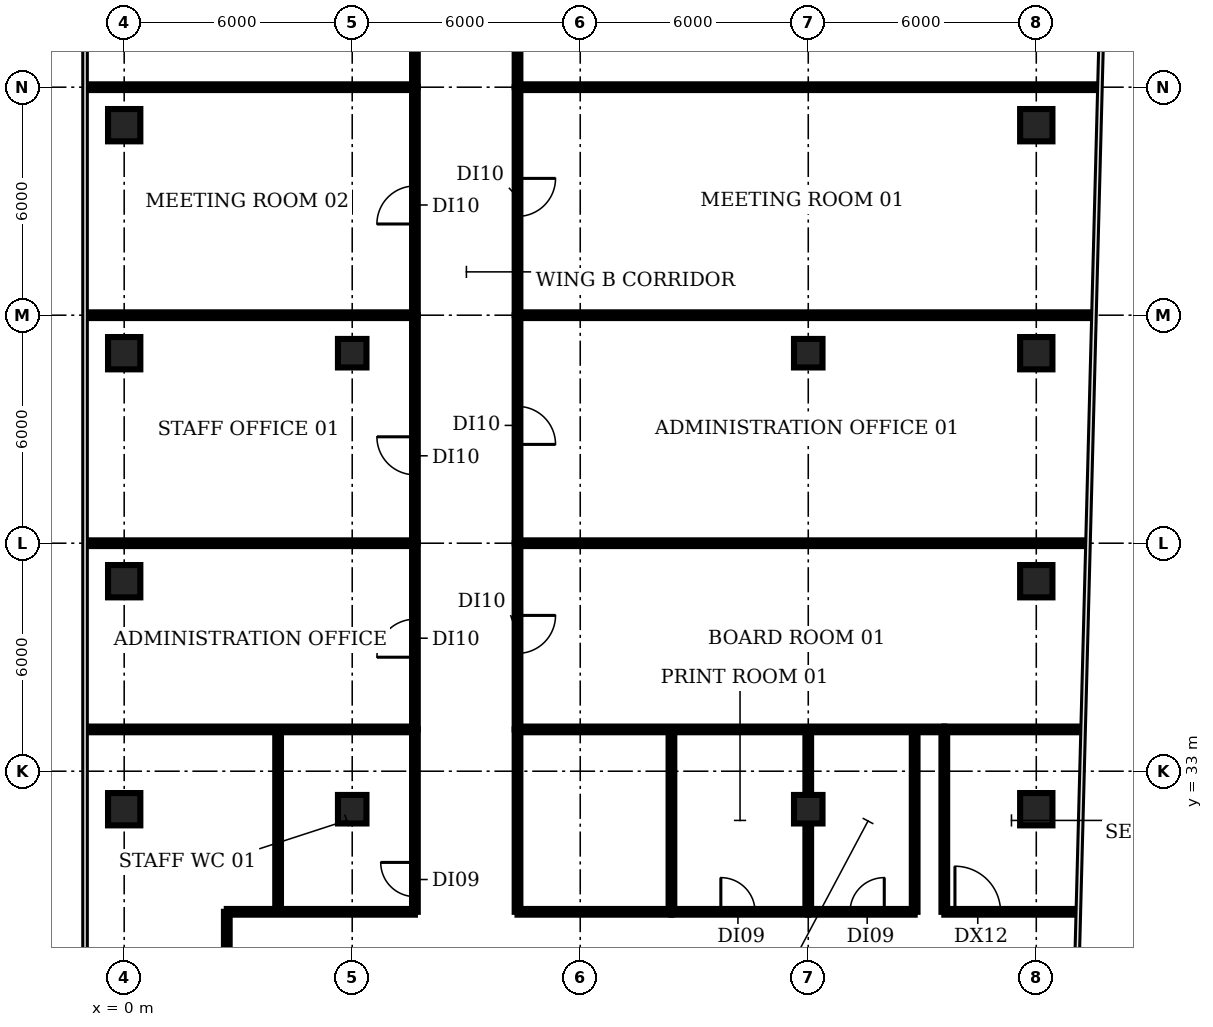
"""IFC4 building model, lengths in metres.
Left out: names, types, materials, properties, quantities, classifications, styles, units other than length and angle.
Written with IfcOpenShell. Run it as: python <this file> out.ifc"""

import sys

from ifc_helpers import new_model, si_unit, direction, frame, frame_2d, origin, origin_2d, place, context, subcontext, project, spatial, rectangle, extrude, element, fill, save


model = new_model("IFC4")
c1 = context("Model", 3, precision=1e-05, world=origin(), true_north=direction((0.0, 1.0)))
c2 = subcontext(c1, "Body", "Model", "MODEL_VIEW")
j1 = project(units=[si_unit("LENGTHUNIT", "METRE"), si_unit("PLANEANGLEUNIT", "RADIAN")], contexts=[c1])
p1 = place(None, origin())
s1 = spatial("IfcSite", under=j1, at=p1, CompositionType="ELEMENT")
p2 = place(p1, origin())
s2 = spatial("IfcBuilding", under=s1, at=p2, CompositionType="ELEMENT")
p3 = place(p2, frame((0.0, 0.0, 163.4)))
s3 = spatial("IfcBuildingStorey", under=s2, at=p3, CompositionType="ELEMENT", Elevation=163.4)
for number, where, z_axis, x_axis in (
    (1, (0.0, 32.0, 0.0), (0.0, 0.0, 1.0), (1.0, 0.0, 0.0)),
    (2, (0.0, 38.0, 0.0), (0.0, 0.0, 1.0), (1.0, 0.0, 0.0)),
    (3, (0.0, 44.0, 0.0), (0.0, 0.0, 1.0), (1.0, 0.0, 0.0)),
    (4, (0.0, 50.0, 0.0), (0.0, 0.0, 1.0), (1.0, 0.0, 0.0)),
):
    element("IfcColumn", number, at=place(p3, frame(where, z_axis=z_axis, x_axis=x_axis)), inside=s3, PredefinedType="COLUMN", context=c2, shape_type="SweptSolid", body=[
        extrude(rectangle(XDim=0.85, YDim=0.85, at=origin_2d()), origin(), (0.0, 0.0, 1.0), 3.85),
    ])
for number, where, z_axis, x_axis in (
    (5, (6.0, 32.0, 0.0), (0.0, 0.0, 1.0), (1.0, 0.0, 0.0)),
    (6, (6.0, 44.0, 0.0), (0.0, 0.0, 1.0), (1.0, 0.0, 0.0)),
    (7, (18.0, 32.0, 0.0), (0.0, 0.0, 1.0), (1.0, 0.0, 0.0)),
    (8, (18.0, 44.0, 0.0), (0.0, 0.0, 1.0), (1.0, 0.0, 0.0)),
):
    element("IfcColumn", number, at=place(p3, frame(where, z_axis=z_axis, x_axis=x_axis)), inside=s3, PredefinedType="COLUMN", context=c2, shape_type="SweptSolid", body=[
        extrude(rectangle(XDim=0.75, YDim=0.75, at=origin_2d()), origin(), (0.0, 0.0, 1.0), 3.85),
    ])
for number, where, z_axis, x_axis in (
    (9, (24.0, 32.0, 0.0), (0.0, 0.0, 1.0), (1.0, 0.0, 0.0)),
    (10, (24.0, 38.0, 0.0), (0.0, 0.0, 1.0), (1.0, 0.0, 0.0)),
    (11, (24.0, 44.0, 0.0), (0.0, 0.0, 1.0), (1.0, 0.0, 0.0)),
    (12, (24.0, 50.0, 0.0), (0.0, 0.0, 1.0), (1.0, 0.0, 0.0)),
):
    element("IfcColumn", number, at=place(p3, frame(where, z_axis=z_axis, x_axis=x_axis)), inside=s3, PredefinedType="COLUMN", context=c2, shape_type="SweptSolid", body=[
        extrude(rectangle(XDim=0.85, YDim=0.85, at=origin_2d()), origin(), (0.0, 0.0, 1.0), 3.85),
    ])
for number, where, z_axis, x_axis in (
    (13, (-0.98, 34.1, 0.0), (0.0, 0.0, 1.0), (1.0, 0.0, 0.0)),
    (14, (-0.98, 39.0, 0.0), (0.0, 0.0, 1.0), (1.0, 0.0, 0.0)),
):
    element("IfcWall", number, at=place(p3, frame(where, z_axis=z_axis, x_axis=x_axis)), inside=s3, PredefinedType="PARTITIONING", context=c2, shape_type="SweptSolid", body=[
        extrude(rectangle(XDim=8.63, YDim=0.15, at=frame_2d((4.315, 0.0))), origin(), (0.0, 0.0, 1.0), 2.88),
    ])
for number, where, z_axis, x_axis in (
    (15, (-0.965, 45.0, 0.0), (0.0, 0.0, 1.0), (1.0, 0.0, 0.0)),
    (16, (-0.965, 51.0, 0.0), (0.0, 0.0, 1.0), (1.0, 0.0, 0.0)),
):
    element("IfcWall", number, at=place(p3, frame(where, z_axis=z_axis, x_axis=x_axis)), inside=s3, PredefinedType="PARTITIONING", context=c2, shape_type="SweptSolid", body=[
        extrude(rectangle(XDim=8.615, YDim=0.15, at=frame_2d((4.308, 0.0))), origin(), (0.0, 0.0, 1.0), 2.88),
    ])
p4 = place(p3, frame((2.7, 25.4, 0.0), z_axis=(0.0, 0.0, 1.0), x_axis=(0.0, 1.0, 0.0)))
e17 = element("IfcWall", 17, at=p4, inside=s3, PredefinedType="PARTITIONING", context=c2, shape_type="SweptSolid", body=[
    extrude(rectangle(XDim=3.9, YDim=0.15, at=frame_2d((1.95, 0.0))), origin(), (0.0, 0.0, 1.0), 2.88),
])
p5 = place(p3, frame((2.7, 29.3, 0.0), z_axis=(0.0, 0.0, 1.0), x_axis=(1.0, 0.0, 0.0)))
e18 = element("IfcWall", 18, at=p5, inside=s3, PredefinedType="PARTITIONING", context=c2, shape_type="SweptSolid", body=[
    extrude(rectangle(XDim=4.95, YDim=0.15, at=frame_2d((2.475, 0.0))), origin(), (0.0, 0.0, 1.0), 2.88),
])
p6 = place(p3, frame((4.05, 29.3, 0.0), z_axis=(0.0, 0.0, 1.0), x_axis=(0.0, 1.0, 0.0)))
e19 = element("IfcWall", 19, at=p6, inside=s3, PredefinedType="PARTITIONING", context=c2, shape_type="SweptSolid", body=[
    extrude(rectangle(XDim=4.8, YDim=0.15, at=frame_2d((2.4, 0.0))), origin(), (0.0, 0.0, 1.0), 2.88),
])
p7 = place(p3, frame((7.65, 29.3, 0.0), z_axis=(0.0, 0.0, 1.0), x_axis=(0.0, 1.0, 0.0)))
e20 = element("IfcWall", 20, at=p7, inside=s3, PredefinedType="PARTITIONING", context=c2, shape_type="SweptSolid", body=[
    extrude(rectangle(XDim=4.8, YDim=0.15, at=frame_2d((2.4, 0.0))), origin(), (0.0, 0.0, 1.0), 2.88),
])
p8 = place(p7, frame((0.4, 0.0, 0.0)))
e21 = element("IfcOpeningElement", 21, at=p8, cuts=e20, PredefinedType="OPENING", context=c2, shape_type="SweptSolid", body=[
    extrude(rectangle(XDim=0.9, YDim=2.1, at=frame_2d((0.45, 1.05))), frame((0.0, 0.085, 0.0), z_axis=(0.0, -1.0, 0.0), x_axis=(1.0, 0.0, 0.0)), (0.0, 0.0, 1.0), 0.17),
])
p9 = place(p3, frame((7.65, 34.1, 0.0), z_axis=(0.0, 0.0, 1.0), x_axis=(0.0, 1.0, 0.0)))
e22 = element("IfcWall", 22, at=p9, inside=s3, PredefinedType="PARTITIONING", context=c2, shape_type="SweptSolid", body=[
    extrude(rectangle(XDim=4.9, YDim=0.15, at=frame_2d((2.45, 0.0))), origin(), (0.0, 0.0, 1.0), 2.88),
])
p10 = place(p9, frame((1.9, 0.0, 0.0)))
e23 = element("IfcOpeningElement", 23, at=p10, cuts=e22, PredefinedType="OPENING", context=c2, shape_type="SweptSolid", body=[
    extrude(rectangle(XDim=1.0, YDim=2.1, at=frame_2d((0.5, 1.05))), frame((0.0, 0.085, 0.0), z_axis=(0.0, -1.0, 0.0), x_axis=(1.0, 0.0, 0.0)), (0.0, 0.0, 1.0), 0.17),
])
p11 = place(p3, frame((7.65, 39.0, 0.0), z_axis=(0.0, 0.0, 1.0), x_axis=(0.0, 1.0, 0.0)))
e24 = element("IfcWall", 24, at=p11, inside=s3, PredefinedType="PARTITIONING", context=c2, shape_type="SweptSolid", body=[
    extrude(rectangle(XDim=6.0, YDim=0.15, at=frame_2d((3.0, 0.0))), origin(), (0.0, 0.0, 1.0), 2.88),
])
p12 = place(p11, frame((1.8, 0.0, 0.0)))
e25 = element("IfcOpeningElement", 25, at=p12, cuts=e24, PredefinedType="OPENING", context=c2, shape_type="SweptSolid", body=[
    extrude(rectangle(XDim=1.0, YDim=2.1, at=frame_2d((0.5, 1.05))), frame((0.0, 0.085, 0.0), z_axis=(0.0, -1.0, 0.0), x_axis=(1.0, 0.0, 0.0)), (0.0, 0.0, 1.0), 0.17),
])
p13 = place(p3, frame((7.65, 45.0, 0.0), z_axis=(0.0, 0.0, 1.0), x_axis=(0.0, 1.0, 0.0)))
e26 = element("IfcWall", 26, at=p13, inside=s3, PredefinedType="PARTITIONING", context=c2, shape_type="SweptSolid", body=[
    extrude(rectangle(XDim=6.0, YDim=0.15, at=frame_2d((3.0, 0.0))), origin(), (0.0, 0.0, 1.0), 2.88),
])
p14 = place(p13, frame((2.4, 0.0, 0.0)))
e27 = element("IfcOpeningElement", 27, at=p14, cuts=e26, PredefinedType="OPENING", context=c2, shape_type="SweptSolid", body=[
    extrude(rectangle(XDim=1.0, YDim=2.1, at=frame_2d((0.5, 1.05))), frame((0.0, 0.085, 0.0), z_axis=(0.0, -1.0, 0.0), x_axis=(1.0, 0.0, 0.0)), (0.0, 0.0, 1.0), 0.17),
])
p15 = place(p3, frame((7.65, 51.0, 0.0), z_axis=(0.0, 0.0, 1.0), x_axis=(0.0, 1.0, 0.0)))
e28 = element("IfcWall", 28, at=p15, inside=s3, PredefinedType="PARTITIONING", context=c2, shape_type="SweptSolid", body=[
    extrude(rectangle(XDim=12.083, YDim=0.15, at=frame_2d((6.042, 0.0))), origin(), (0.0, 0.0, 1.0), 2.88),
])
p16 = place(p15, frame((6.97, 0.0, 0.0)))
e29 = element("IfcOpeningElement", 29, at=p16, cuts=e28, PredefinedType="OPENING", context=c2, shape_type="SweptSolid", body=[
    extrude(rectangle(XDim=1.2, YDim=2.1, at=frame_2d((0.6, 1.05))), frame((0.0, 0.085, 0.0), z_axis=(0.0, -1.0, 0.0), x_axis=(1.0, 0.0, 0.0)), (0.0, 0.0, 1.0), 0.17),
])
p17 = place(p3, frame((10.35, 29.3, 0.0), z_axis=(0.0, 0.0, 1.0), x_axis=(0.0, 1.0, 0.0)))
e30 = element("IfcWall", 30, at=p17, inside=s3, PredefinedType="PARTITIONING", context=c2, shape_type="SweptSolid", body=[
    extrude(rectangle(XDim=4.8, YDim=0.15, at=frame_2d((2.4, 0.0))), origin(), (0.0, 0.0, 1.0), 2.88),
])
p18 = place(p3, frame((10.35, 29.3, 0.0), z_axis=(0.0, 0.0, 1.0), x_axis=(1.0, 0.0, 0.0)))
e31 = element("IfcWall", 31, at=p18, inside=s3, PredefinedType="PARTITIONING", context=c2, shape_type="SweptSolid", body=[
    extrude(rectangle(XDim=4.05, YDim=0.15, at=frame_2d((2.025, 0.0))), origin(), (0.0, 0.0, 1.0), 2.88),
])
p19 = place(p3, frame((10.35, 34.1, 0.0), z_axis=(0.0, 0.0, 1.0), x_axis=(1.0, 0.0, 0.0)))
e32 = element("IfcWall", 32, at=p19, inside=s3, PredefinedType="PARTITIONING", context=c2, shape_type="SweptSolid", body=[
    extrude(rectangle(XDim=11.23, YDim=0.15, at=frame_2d((5.615, 0.0))), origin(), (0.0, 0.0, 1.0), 2.88),
])
p20 = place(p3, frame((10.35, 39.0, 0.0), z_axis=(0.0, 0.0, 1.0), x_axis=(0.0, -1.0, 0.0)))
e33 = element("IfcWall", 33, at=p20, inside=s3, PredefinedType="PARTITIONING", context=c2, shape_type="SweptSolid", body=[
    extrude(rectangle(XDim=4.9, YDim=0.15, at=frame_2d((2.45, 0.0))), origin(), (0.0, 0.0, 1.0), 2.88),
])
p21 = place(p20, frame((1.9, 0.0, 0.0)))
e34 = element("IfcOpeningElement", 34, at=p21, cuts=e33, PredefinedType="OPENING", context=c2, shape_type="SweptSolid", body=[
    extrude(rectangle(XDim=1.0, YDim=2.1, at=frame_2d((0.5, 1.05))), frame((0.0, 0.085, 0.0), z_axis=(0.0, -1.0, 0.0), x_axis=(1.0, 0.0, 0.0)), (0.0, 0.0, 1.0), 0.17),
])
p22 = place(p3, frame((10.35, 39.0, 0.0), z_axis=(0.0, 0.0, 1.0), x_axis=(1.0, 0.0, 0.0)))
e35 = element("IfcWall", 35, at=p22, inside=s3, PredefinedType="PARTITIONING", context=c2, shape_type="SweptSolid", body=[
    extrude(rectangle(XDim=14.96, YDim=0.15, at=frame_2d((7.48, 0.0))), origin(), (0.0, 0.0, 1.0), 2.88),
])
p23 = place(p3, frame((10.35, 45.0, 0.0), z_axis=(0.0, 0.0, 1.0), x_axis=(0.0, -1.0, 0.0)))
e36 = element("IfcWall", 36, at=p23, inside=s3, PredefinedType="PARTITIONING", context=c2, shape_type="SweptSolid", body=[
    extrude(rectangle(XDim=6.0, YDim=0.15, at=frame_2d((3.0, 0.0))), origin(), (0.0, 0.0, 1.0), 2.88),
])
p24 = place(p23, frame((2.4, 0.0, 0.0)))
e37 = element("IfcOpeningElement", 37, at=p24, cuts=e36, PredefinedType="OPENING", context=c2, shape_type="SweptSolid", body=[
    extrude(rectangle(XDim=1.0, YDim=2.1, at=frame_2d((0.5, 1.05))), frame((0.0, 0.085, 0.0), z_axis=(0.0, -1.0, 0.0), x_axis=(1.0, 0.0, 0.0)), (0.0, 0.0, 1.0), 0.17),
])
p25 = place(p3, frame((10.35, 45.0, 0.0), z_axis=(0.0, 0.0, 1.0), x_axis=(1.0, 0.0, 0.0)))
e38 = element("IfcWall", 38, at=p25, inside=s3, PredefinedType="PARTITIONING", context=c2, shape_type="SweptSolid", body=[
    extrude(rectangle(XDim=15.12, YDim=0.15, at=frame_2d((7.56, 0.0))), origin(), (0.0, 0.0, 1.0), 2.88),
])
p26 = place(p3, frame((10.35, 51.0, 0.0), z_axis=(0.0, 0.0, 1.0), x_axis=(0.0, -1.0, 0.0)))
e39 = element("IfcWall", 39, at=p26, inside=s3, PredefinedType="PARTITIONING", context=c2, shape_type="SweptSolid", body=[
    extrude(rectangle(XDim=6.0, YDim=0.15, at=frame_2d((3.0, 0.0))), origin(), (0.0, 0.0, 1.0), 2.88),
])
p27 = place(p26, frame((2.4, 0.0, 0.0)))
e40 = element("IfcOpeningElement", 40, at=p27, cuts=e39, PredefinedType="OPENING", context=c2, shape_type="SweptSolid", body=[
    extrude(rectangle(XDim=1.0, YDim=2.1, at=frame_2d((0.5, 1.05))), frame((0.0, 0.085, 0.0), z_axis=(0.0, -1.0, 0.0), x_axis=(1.0, 0.0, 0.0)), (0.0, 0.0, 1.0), 0.17),
])
p28 = place(p3, frame((10.35, 51.0, 0.0), z_axis=(0.0, 0.0, 1.0), x_axis=(1.0, 0.0, 0.0)))
e41 = element("IfcWall", 41, at=p28, inside=s3, PredefinedType="PARTITIONING", context=c2, shape_type="SweptSolid", body=[
    extrude(rectangle(XDim=15.28, YDim=0.15, at=frame_2d((7.64, 0.0))), origin(), (0.0, 0.0, 1.0), 2.88),
])
p29 = place(p3, frame((10.35, 63.085, 0.0), z_axis=(0.0, 0.0, 1.0), x_axis=(0.0, -1.0, 0.0)))
e42 = element("IfcWall", 42, at=p29, inside=s3, PredefinedType="PARTITIONING", context=c2, shape_type="SweptSolid", body=[
    extrude(rectangle(XDim=12.085, YDim=0.15, at=frame_2d((6.042, 0.0))), origin(), (0.0, 0.0, 1.0), 2.88),
])
p30 = place(p29, frame((5.585, 0.0, 0.0)))
e43 = element("IfcOpeningElement", 43, at=p30, cuts=e42, PredefinedType="OPENING", context=c2, shape_type="SweptSolid", body=[
    extrude(rectangle(XDim=1.2, YDim=2.1, at=frame_2d((0.6, 1.05))), frame((0.0, 0.085, 0.0), z_axis=(0.0, -1.0, 0.0), x_axis=(1.0, 0.0, 0.0)), (0.0, 0.0, 1.0), 0.17),
])
p31 = place(p3, frame((14.4, 29.3, 0.0), z_axis=(0.0, 0.0, 1.0), x_axis=(0.0, 1.0, 0.0)))
e44 = element("IfcWall", 44, at=p31, inside=s3, PredefinedType="PARTITIONING", context=c2, shape_type="SweptSolid", body=[
    extrude(rectangle(XDim=4.8, YDim=0.15, at=frame_2d((2.4, 0.0))), origin(), (0.0, 0.0, 1.0), 2.88),
])
p32 = place(p3, frame((14.4, 29.3, 0.0), z_axis=(0.0, 0.0, 1.0), x_axis=(1.0, 0.0, 0.0)))
e45 = element("IfcWall", 45, at=p32, inside=s3, PredefinedType="PARTITIONING", context=c2, shape_type="SweptSolid", body=[
    extrude(rectangle(XDim=3.6, YDim=0.15, at=frame_2d((1.8, 0.0))), origin(), (0.0, 0.0, 1.0), 2.88),
])
p33 = place(p32, frame((1.3, 0.0, 0.0)))
e46 = element("IfcOpeningElement", 46, at=p33, cuts=e45, PredefinedType="OPENING", context=c2, shape_type="SweptSolid", body=[
    extrude(rectangle(XDim=0.9, YDim=2.1, at=frame_2d((0.45, 1.05))), frame((0.0, 0.085, 0.0), z_axis=(0.0, -1.0, 0.0), x_axis=(1.0, 0.0, 0.0)), (0.0, 0.0, 1.0), 0.17),
])
p34 = place(p3, frame((18.0, 29.3, 0.0), z_axis=(0.0, 0.0, 1.0), x_axis=(0.0, 1.0, 0.0)))
e47 = element("IfcWall", 47, at=p34, inside=s3, PredefinedType="PARTITIONING", context=c2, shape_type="SweptSolid", body=[
    extrude(rectangle(XDim=4.8, YDim=0.15, at=frame_2d((2.4, 0.0))), origin(), (0.0, 0.0, 1.0), 2.88),
])
p35 = place(p3, frame((18.0, 29.3, 0.0), z_axis=(0.0, 0.0, 1.0), x_axis=(1.0, 0.0, 0.0)))
e48 = element("IfcWall", 48, at=p35, inside=s3, PredefinedType="PARTITIONING", context=c2, shape_type="SweptSolid", body=[
    extrude(rectangle(XDim=2.8, YDim=0.15, at=frame_2d((1.4, 0.0))), origin(), (0.0, 0.0, 1.0), 2.88),
])
p36 = place(p35, frame((1.1, 0.0, 0.0)))
e49 = element("IfcOpeningElement", 49, at=p36, cuts=e48, PredefinedType="OPENING", context=c2, shape_type="SweptSolid", body=[
    extrude(rectangle(XDim=0.9, YDim=2.1, at=frame_2d((0.45, 1.05))), frame((0.0, 0.085, 0.0), z_axis=(0.0, -1.0, 0.0), x_axis=(1.0, 0.0, 0.0)), (0.0, 0.0, 1.0), 0.17),
])
for number, where, z_axis, x_axis in (
    (50, (20.8, 29.3, 0.0), (0.0, 0.0, 1.0), (0.0, 1.0, 0.0)),
    (51, (21.58, 29.3, 0.0), (0.0, 0.0, 1.0), (0.0, 1.0, 0.0)),
):
    element("IfcWall", number, at=place(p3, frame(where, z_axis=z_axis, x_axis=x_axis)), inside=s3, PredefinedType="PARTITIONING", context=c2, shape_type="SweptSolid", body=[
        extrude(rectangle(XDim=4.8, YDim=0.15, at=frame_2d((2.4, 0.0))), origin(), (0.0, 0.0, 1.0), 2.88),
    ])
p37 = place(p3, frame((21.58, 29.3, 0.0), z_axis=(0.0, 0.0, 1.0), x_axis=(1.0, 0.0, 0.0)))
e52 = element("IfcWall", 52, at=p37, inside=s3, PredefinedType="PARTITIONING", context=c2, shape_type="SweptSolid", body=[
    extrude(rectangle(XDim=3.48, YDim=0.15, at=frame_2d((1.74, 0.0))), origin(), (0.0, 0.0, 1.0), 2.88),
])
p38 = place(p37, frame((0.28, 0.0, 0.0)))
e53 = element("IfcOpeningElement", 53, at=p38, cuts=e52, PredefinedType="OPENING", context=c2, shape_type="SweptSolid", body=[
    extrude(rectangle(XDim=1.2, YDim=2.1, at=frame_2d((0.6, 1.05))), frame((0.0, 0.085, 0.0), z_axis=(0.0, -1.0, 0.0), x_axis=(1.0, 0.0, 0.0)), (0.0, 0.0, 1.0), 0.17),
])
p39 = place(p3, frame((21.58, 34.1, 0.0), z_axis=(0.0, 0.0, 1.0), x_axis=(1.0, 0.0, 0.0)))
e54 = element("IfcWall", 54, at=p39, inside=s3, PredefinedType="PARTITIONING", context=c2, shape_type="SweptSolid", body=[
    extrude(rectangle(XDim=3.6, YDim=0.15, at=frame_2d((1.8, 0.0))), origin(), (0.0, 0.0, 1.0), 2.88),
])
p40 = place(p8, origin())
e55 = element("IfcDoor", 55, at=p40, inside=s3, OperationType="SINGLE_SWING_RIGHT", PredefinedType="DOOR", context=c2, shape_type="SweptSolid", body=[
    extrude(rectangle(XDim=0.9, YDim=2.1, at=frame_2d((0.45, 1.05))), frame((0.0, 0.025, 0.0), z_axis=(0.0, -1.0, 0.0), x_axis=(1.0, 0.0, 0.0)), (0.0, 0.0, 1.0), 0.05),
])
fill(e21, e55)
p41 = place(p10, origin())
e56 = element("IfcDoor", 56, at=p41, inside=s3, OperationType="SINGLE_SWING_LEFT", PredefinedType="DOOR", context=c2, shape_type="SweptSolid", body=[
    extrude(rectangle(XDim=1.0, YDim=2.1, at=frame_2d((0.5, 1.05))), frame((0.0, 0.025, 0.0), z_axis=(0.0, -1.0, 0.0), x_axis=(1.0, 0.0, 0.0)), (0.0, 0.0, 1.0), 0.05),
])
fill(e23, e56)
p42 = place(p12, origin())
e57 = element("IfcDoor", 57, at=p42, inside=s3, OperationType="SINGLE_SWING_RIGHT", PredefinedType="DOOR", context=c2, shape_type="SweptSolid", body=[
    extrude(rectangle(XDim=1.0, YDim=2.1, at=frame_2d((0.5, 1.05))), frame((0.0, 0.025, 0.0), z_axis=(0.0, -1.0, 0.0), x_axis=(1.0, 0.0, 0.0)), (0.0, 0.0, 1.0), 0.05),
])
fill(e25, e57)
p43 = place(p14, origin())
e58 = element("IfcDoor", 58, at=p43, inside=s3, OperationType="SINGLE_SWING_LEFT", PredefinedType="DOOR", context=c2, shape_type="SweptSolid", body=[
    extrude(rectangle(XDim=1.0, YDim=2.1, at=frame_2d((0.5, 1.05))), frame((0.0, 0.025, 0.0), z_axis=(0.0, -1.0, 0.0), x_axis=(1.0, 0.0, 0.0)), (0.0, 0.0, 1.0), 0.05),
])
fill(e27, e58)
p44 = place(p21, origin())
e59 = element("IfcDoor", 59, at=p44, inside=s3, OperationType="SINGLE_SWING_LEFT", PredefinedType="DOOR", context=c2, shape_type="SweptSolid", body=[
    extrude(rectangle(XDim=1.0, YDim=2.1, at=frame_2d((0.5, 1.05))), frame((0.0, 0.025, 0.0), z_axis=(0.0, -1.0, 0.0), x_axis=(1.0, 0.0, 0.0)), (0.0, 0.0, 1.0), 0.05),
])
fill(e34, e59)
p45 = place(p24, origin())
e60 = element("IfcDoor", 60, at=p45, inside=s3, OperationType="SINGLE_SWING_RIGHT", PredefinedType="DOOR", context=c2, shape_type="SweptSolid", body=[
    extrude(rectangle(XDim=1.0, YDim=2.1, at=frame_2d((0.5, 1.05))), frame((0.0, 0.025, 0.0), z_axis=(0.0, -1.0, 0.0), x_axis=(1.0, 0.0, 0.0)), (0.0, 0.0, 1.0), 0.05),
])
fill(e37, e60)
p46 = place(p27, origin())
e61 = element("IfcDoor", 61, at=p46, inside=s3, OperationType="SINGLE_SWING_LEFT", PredefinedType="DOOR", context=c2, shape_type="SweptSolid", body=[
    extrude(rectangle(XDim=1.0, YDim=2.1, at=frame_2d((0.5, 1.05))), frame((0.0, 0.025, 0.0), z_axis=(0.0, -1.0, 0.0), x_axis=(1.0, 0.0, 0.0)), (0.0, 0.0, 1.0), 0.05),
])
fill(e40, e61)
p47 = place(p33, origin())
e62 = element("IfcDoor", 62, at=p47, inside=s3, OperationType="SINGLE_SWING_LEFT", PredefinedType="DOOR", context=c2, shape_type="SweptSolid", body=[
    extrude(rectangle(XDim=0.9, YDim=2.1, at=frame_2d((0.45, 1.05))), frame((0.0, 0.025, 0.0), z_axis=(0.0, -1.0, 0.0), x_axis=(1.0, 0.0, 0.0)), (0.0, 0.0, 1.0), 0.05),
])
fill(e46, e62)
p48 = place(p36, origin())
e63 = element("IfcDoor", 63, at=p48, inside=s3, OperationType="SINGLE_SWING_RIGHT", PredefinedType="DOOR", context=c2, shape_type="SweptSolid", body=[
    extrude(rectangle(XDim=0.9, YDim=2.1, at=frame_2d((0.45, 1.05))), frame((0.0, 0.025, 0.0), z_axis=(0.0, -1.0, 0.0), x_axis=(1.0, 0.0, 0.0)), (0.0, 0.0, 1.0), 0.05),
])
fill(e49, e63)
p49 = place(p38, origin())
e64 = element("IfcDoor", 64, at=p49, inside=s3, OperationType="SINGLE_SWING_LEFT", PredefinedType="DOOR", context=c2, shape_type="SweptSolid", body=[
    extrude(rectangle(XDim=1.2, YDim=2.1, at=frame_2d((0.6, 1.05))), frame((0.0, 0.025, 0.0), z_axis=(0.0, -1.0, 0.0), x_axis=(1.0, 0.0, 0.0)), (0.0, 0.0, 1.0), 0.05),
])
fill(e53, e64)
save(model, sys.argv[1])
